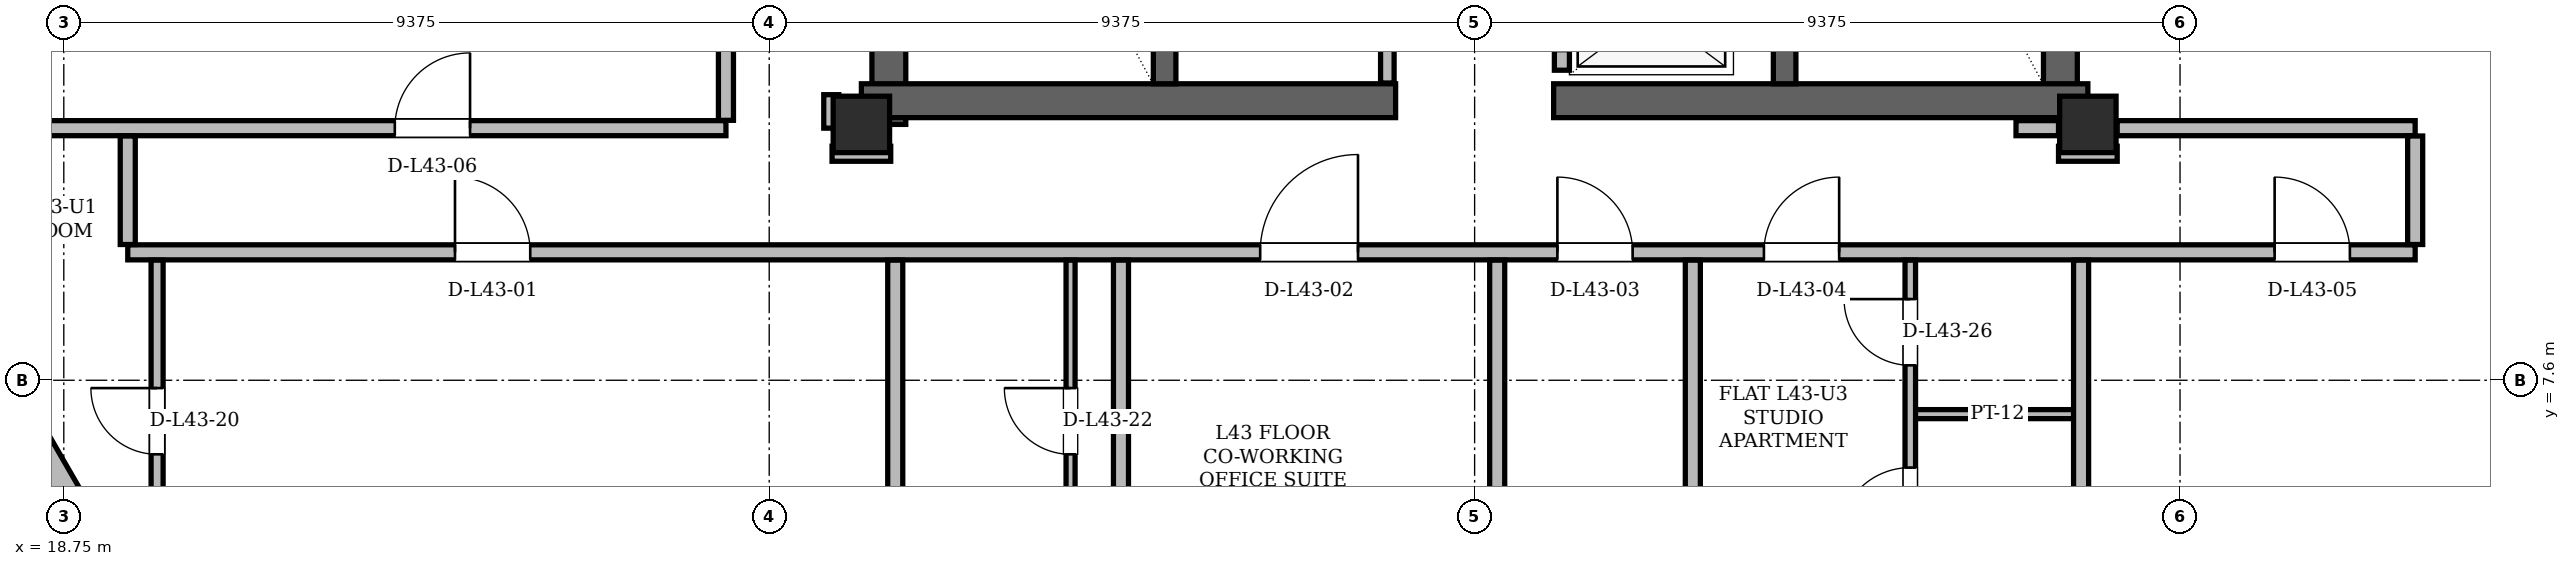
"""IFC4 building model, lengths in metres.
Left out: names, types, materials, properties, quantities, classifications, styles, units other than length and angle.
Written with IfcOpenShell. Run it as: python <this file> out.ifc"""

import sys

from ifc_helpers import new_model, si_unit, direction, frame, frame_2d, origin, origin_2d, place, context, subcontext, project, spatial, rectangle, hollow_rectangle, extrude, element, fill, save


model = new_model("IFC4")
c1 = context("Model", 3, precision=1e-05, world=origin(), true_north=direction((0.0, 1.0)))
c2 = subcontext(c1, "Body", "Model", "MODEL_VIEW")
j1 = project(units=[si_unit("LENGTHUNIT", "METRE"), si_unit("PLANEANGLEUNIT", "RADIAN")], contexts=[c1])
p1 = place(None, origin())
s1 = spatial("IfcSite", under=j1, at=p1, CompositionType="ELEMENT")
p2 = place(p1, origin())
s2 = spatial("IfcBuilding", under=s1, at=p2, CompositionType="ELEMENT")
p3 = place(p2, frame((0.0, 0.0, 163.8)))
s3 = spatial("IfcBuildingStorey", under=s2, at=p3, CompositionType="ELEMENT", Elevation=163.8)
for number, where, z_axis, x_axis in (
    (1, (29.35, 11.0, 0.0), (0.0, 0.0, 1.0), (1.0, 0.0, 0.0)),
    (2, (45.65, 11.0, 0.0), (0.0, 0.0, 1.0), (1.0, 0.0, 0.0)),
):
    element("IfcColumn", number, at=place(p3, frame(where, z_axis=z_axis, x_axis=x_axis)), inside=s3, PredefinedType="COLUMN", context=c2, shape_type="SweptSolid", body=[
        extrude(hollow_rectangle(XDim=0.75, YDim=0.75, WallThickness=0.06, at=origin_2d()), origin(), (0.0, 0.0, 1.0), 3.6),
    ])
for number, where, z_axis, x_axis in (
    (3, (29.715, 11.0, 0.0), (0.0, 0.0, 1.0), (0.0, 1.0, 0.0)),
    (4, (45.285, 11.0, 0.0), (0.0, 0.0, 1.0), (0.0, 1.0, 0.0)),
):
    element("IfcWall", number, at=place(p3, frame(where, z_axis=z_axis, x_axis=x_axis)), inside=s3, PredefinedType="SHEAR", context=c2, shape_type="SweptSolid", body=[
        extrude(rectangle(XDim=13.3, YDim=0.45, at=frame_2d((6.65, 0.0))), origin(), (0.0, 0.0, 1.0), 3.38),
    ])
for number, where, z_axis, x_axis in (
    (5, (29.35, 11.315, 0.0), (0.0, 0.0, 1.0), (1.0, 0.0, 0.0)),
    (6, (38.55, 11.315, 0.0), (0.0, 0.0, 1.0), (1.0, 0.0, 0.0)),
):
    element("IfcWall", number, at=place(p3, frame(where, z_axis=z_axis, x_axis=x_axis)), inside=s3, PredefinedType="SHEAR", context=c2, shape_type="SweptSolid", body=[
        extrude(rectangle(XDim=7.1, YDim=0.45, at=frame_2d((3.55, 0.0))), origin(), (0.0, 0.0, 1.0), 3.38),
    ])
for number, where, z_axis, x_axis in (
    (7, (33.38, 11.54, 0.0), (0.0, 0.0, 1.0), (0.0, 1.0, 0.0)),
    (8, (41.62, 11.54, 0.0), (0.0, 0.0, 1.0), (0.0, 1.0, 0.0)),
):
    element("IfcWall", number, at=place(p3, frame(where, z_axis=z_axis, x_axis=x_axis)), inside=s3, PredefinedType="SHEAR", context=c2, shape_type="SweptSolid", body=[
        extrude(rectangle(XDim=7.62, YDim=0.3, at=frame_2d((3.81, 0.0))), origin(), (0.0, 0.0, 1.0), 3.38),
    ])
p4 = place(p3, frame((15.196, 12.344, 0.0), z_axis=(0.0, 0.0, 1.0), x_axis=(0.500013908369, -0.866017373635, 0.0)))
e9 = element("IfcWall", 9, at=p4, inside=s3, PredefinedType="SOLIDWALL", context=c2, shape_type="SweptSolid", body=[
    extrude(rectangle(XDim=8.87, YDim=0.34, at=frame_2d((4.435, 0.0))), origin(), (0.0, 0.0, 1.0), 2.6),
])
p5 = place(p3, frame((36.34, 11.55, 0.0), z_axis=(0.0, 0.0, 1.0), x_axis=(0.0, 1.0, 0.0)))
e10 = element("IfcWall", 10, at=p5, inside=s3, PredefinedType="PARTITIONING", context=c2, shape_type="SweptSolid", body=[
    extrude(rectangle(XDim=5.55, YDim=0.18, at=frame_2d((2.775, 0.0))), origin(), (0.0, 0.0, 1.0), 3.38),
])
p6 = place(p5, frame((2.85, 0.0, 0.0)))
e11 = element("IfcOpeningElement", 11, at=p6, cuts=e10, PredefinedType="OPENING", context=c2, shape_type="SweptSolid", body=[
    extrude(rectangle(XDim=0.95, YDim=2.1, at=frame_2d((0.475, 1.05))), frame((0.0, 0.09, 0.0), z_axis=(0.0, -1.0, 0.0), x_axis=(1.0, 0.0, 0.0)), (0.0, 0.0, 1.0), 0.18),
])
p7 = place(p3, frame((38.66, 11.72, 0.0), z_axis=(0.0, 0.0, 1.0), x_axis=(0.0, 1.0, 0.0)))
e12 = element("IfcWall", 12, at=p7, inside=s3, PredefinedType="PARTITIONING", context=c2, shape_type="SweptSolid", body=[
    extrude(rectangle(XDim=9.1, YDim=0.2, at=frame_2d((4.55, 0.0))), origin(), (0.0, 0.0, 1.0), 3.38),
])
p8 = place(p7, frame((0.255, 0.0, 0.0)))
e13 = element("IfcOpeningElement", 13, at=p8, cuts=e12, PredefinedType="OPENING", context=c2, shape_type="SweptSolid", body=[
    extrude(rectangle(XDim=1.05, YDim=2.15, at=frame_2d((0.525, 1.075))), frame((0.0, 0.1, 0.0), z_axis=(0.0, -1.0, 0.0), x_axis=(1.0, 0.0, 0.0)), (0.0, 0.0, 1.0), 0.2),
])
p9 = place(p7, frame((2.105, 0.0, 0.0)))
e14 = element("IfcOpeningElement", 14, at=p9, cuts=e12, PredefinedType="OPENING", context=c2, shape_type="SweptSolid", body=[
    extrude(rectangle(XDim=1.05, YDim=2.15, at=frame_2d((0.525, 1.075))), frame((0.0, 0.1, 0.0), z_axis=(0.0, -1.0, 0.0), x_axis=(1.0, 0.0, 0.0)), (0.0, 0.0, 1.0), 0.2),
])
p10 = place(p7, frame((3.955, 0.0, 0.0)))
e15 = element("IfcOpeningElement", 15, at=p10, cuts=e12, PredefinedType="OPENING", context=c2, shape_type="SweptSolid", body=[
    extrude(rectangle(XDim=1.05, YDim=2.15, at=frame_2d((0.525, 1.075))), frame((0.0, 0.1, 0.0), z_axis=(0.0, -1.0, 0.0), x_axis=(1.0, 0.0, 0.0)), (0.0, 0.0, 1.0), 0.2),
])
p11 = place(p3, frame((43.29, 7.15, 0.0), z_axis=(0.0, 0.0, 1.0), x_axis=(1.0, 0.0, 0.0)))
e16 = element("IfcWall", 16, at=p11, inside=s3, PredefinedType="PARTITIONING", context=c2, shape_type="SweptSolid", body=[
    extrude(rectangle(XDim=2.321, YDim=0.12, at=frame_2d((1.16, 0.0))), origin(), (0.0, 0.0, 1.0), 3.38),
])
p12 = place(p3, frame((19.6, 9.3, 0.0), z_axis=(0.0, 0.0, 1.0), x_axis=(1.0, 0.0, 0.0)))
e17 = element("IfcWall", 17, at=p12, inside=s3, PredefinedType="PARTITIONING", context=c2, shape_type="SweptSolid", body=[
    extrude(rectangle(XDim=30.4, YDim=0.2, at=frame_2d((15.2, 0.0))), origin(), (0.0, 0.0, 1.0), 2.842),
])
p13 = place(p12, frame((4.349, 0.0, 0.0)))
e18 = element("IfcOpeningElement", 18, at=p13, cuts=e17, PredefinedType="OPENING", context=c2, shape_type="SweptSolid", body=[
    extrude(rectangle(XDim=1.0, YDim=2.18, at=frame_2d((0.5, 1.09))), frame((0.0, 0.1, 0.0), z_axis=(0.0, -1.0, 0.0), x_axis=(1.0, 0.0, 0.0)), (0.0, 0.0, 1.0), 0.2),
])
p14 = place(p12, frame((15.05, 0.0, 0.0)))
e19 = element("IfcOpeningElement", 19, at=p14, cuts=e17, PredefinedType="OPENING", context=c2, shape_type="SweptSolid", body=[
    extrude(rectangle(XDim=1.3, YDim=2.2, at=frame_2d((0.65, 1.1))), frame((0.0, 0.1, 0.0), z_axis=(0.0, -1.0, 0.0), x_axis=(1.0, 0.0, 0.0)), (0.0, 0.0, 1.0), 0.2),
])
p15 = place(p12, frame((19.0, 0.0, 0.0)))
e20 = element("IfcOpeningElement", 20, at=p15, cuts=e17, PredefinedType="OPENING", context=c2, shape_type="SweptSolid", body=[
    extrude(rectangle(XDim=1.0, YDim=2.18, at=frame_2d((0.5, 1.09))), frame((0.0, 0.1, 0.0), z_axis=(0.0, -1.0, 0.0), x_axis=(1.0, 0.0, 0.0)), (0.0, 0.0, 1.0), 0.2),
])
p16 = place(p12, frame((21.745, 0.0, 0.0)))
e21 = element("IfcOpeningElement", 21, at=p16, cuts=e17, PredefinedType="OPENING", context=c2, shape_type="SweptSolid", body=[
    extrude(rectangle(XDim=1.0, YDim=2.18, at=frame_2d((0.5, 1.09))), frame((0.0, 0.1, 0.0), z_axis=(0.0, -1.0, 0.0), x_axis=(1.0, 0.0, 0.0)), (0.0, 0.0, 1.0), 0.2),
])
p17 = place(p12, frame((28.532, 0.0, 0.0)))
e22 = element("IfcOpeningElement", 22, at=p17, cuts=e17, PredefinedType="OPENING", context=c2, shape_type="SweptSolid", body=[
    extrude(rectangle(XDim=1.0, YDim=2.18, at=frame_2d((0.5, 1.09))), frame((0.0, 0.1, 0.0), z_axis=(0.0, -1.0, 0.0), x_axis=(1.0, 0.0, 0.0)), (0.0, 0.0, 1.0), 0.2),
])
for number, where, z_axis, x_axis in (
    (23, (28.96, 10.61, 0.0), (0.0, 0.0, 1.0), (1.0, 0.0, 0.0)),
    (24, (45.26, 10.61, 0.0), (0.0, 0.0, 1.0), (1.0, 0.0, 0.0)),
):
    element("IfcWall", number, at=place(p3, frame(where, z_axis=z_axis, x_axis=x_axis)), inside=s3, PredefinedType="PARTITIONING", context=c2, shape_type="SweptSolid", body=[
        extrude(rectangle(XDim=0.78, YDim=0.2, at=frame_2d((0.39, 0.0))), origin(), (0.0, 0.0, 1.0), 2.42),
    ])
p18 = place(p3, frame((16.201, 10.95, 0.0), z_axis=(0.0, 0.0, 1.0), x_axis=(1.0, 0.0, 0.0)))
e25 = element("IfcWall", 25, at=p18, inside=s3, PredefinedType="PARTITIONING", context=c2, shape_type="SweptSolid", body=[
    extrude(rectangle(XDim=11.349, YDim=0.2, at=frame_2d((5.674, 0.0))), origin(), (0.0, 0.0, 1.0), 3.38),
])
p19 = place(p18, frame((6.948, 0.0, 0.0)))
e26 = element("IfcOpeningElement", 26, at=p19, cuts=e25, PredefinedType="OPENING", context=c2, shape_type="SweptSolid", body=[
    extrude(rectangle(XDim=1.0, YDim=2.18, at=frame_2d((0.5, 1.09))), frame((0.0, 0.1, 0.0), z_axis=(0.0, -1.0, 0.0), x_axis=(1.0, 0.0, 0.0)), (0.0, 0.0, 1.0), 0.2),
])
p20 = place(p3, frame((44.695, 10.95, 0.0), z_axis=(0.0, 0.0, 1.0), x_axis=(1.0, 0.0, 0.0)))
e27 = element("IfcWall", 27, at=p20, inside=s3, PredefinedType="PARTITIONING", context=c2, shape_type="SweptSolid", body=[
    extrude(rectangle(XDim=0.565, YDim=0.2, at=frame_2d((0.282, 0.0))), origin(), (0.0, 0.0, 1.0), 2.42),
])
p21 = place(p3, frame((46.04, 10.95, 0.0), z_axis=(0.0, 0.0, 1.0), x_axis=(1.0, 0.0, 0.0)))
e28 = element("IfcWall", 28, at=p21, inside=s3, PredefinedType="PARTITIONING", context=c2, shape_type="SweptSolid", body=[
    extrude(rectangle(XDim=3.96, YDim=0.2, at=frame_2d((1.98, 0.0))), origin(), (0.0, 0.0, 1.0), 2.842),
])
p22 = place(p3, frame((19.6, 9.404, 0.0), z_axis=(0.0, 0.0, 1.0), x_axis=(0.0, 1.0, 0.0)))
e29 = element("IfcWall", 29, at=p22, inside=s3, PredefinedType="PARTITIONING", context=c2, shape_type="SweptSolid", body=[
    extrude(rectangle(XDim=1.442, YDim=0.2, at=frame_2d((0.721, 0.0))), origin(), (0.0, 0.0, 1.0), 3.38),
])
p23 = place(p3, frame((19.99, 4.836, 0.0), z_axis=(0.0, 0.0, 1.0), x_axis=(0.0, 1.0, 0.0)))
e30 = element("IfcWall", 30, at=p23, inside=s3, PredefinedType="PARTITIONING", context=c2, shape_type="SweptSolid", body=[
    extrude(rectangle(XDim=4.36, YDim=0.16, at=frame_2d((2.18, 0.0))), origin(), (0.0, 0.0, 1.0), 2.842),
])
p24 = place(p23, frame((1.78, 0.0, 0.0)))
e31 = element("IfcOpeningElement", 31, at=p24, cuts=e30, PredefinedType="OPENING", context=c2, shape_type="SweptSolid", body=[
    extrude(rectangle(XDim=0.88, YDim=2.08, at=frame_2d((0.44, 1.04))), frame((0.0, 0.08, 0.0), z_axis=(0.0, -1.0, 0.0), x_axis=(1.0, 0.0, 0.0)), (0.0, 0.0, 1.0), 0.16),
])
p25 = place(p3, frame((27.55, 11.054, 0.0), z_axis=(0.0, 0.0, 1.0), x_axis=(0.0, 1.0, 0.0)))
e32 = element("IfcWall", 32, at=p25, inside=s3, PredefinedType="PARTITIONING", context=c2, shape_type="SweptSolid", body=[
    extrude(rectangle(XDim=5.692, YDim=0.2, at=frame_2d((2.846, 0.0))), origin(), (0.0, 0.0, 1.0), 2.842),
])
p26 = place(p3, frame((28.95, 10.95, 0.0), z_axis=(0.0, 0.0, 1.0), x_axis=(0.0, 1.0, 0.0)))
e33 = element("IfcWall", 33, at=p26, inside=s3, PredefinedType="PARTITIONING", context=c2, shape_type="SweptSolid", body=[
    extrude(rectangle(XDim=0.445, YDim=0.2, at=frame_2d((0.223, 0.0))), origin(), (0.0, 0.0, 1.0), 2.842),
])
p27 = place(p3, frame((29.8, 4.836, 0.0), z_axis=(0.0, 0.0, 1.0), x_axis=(0.0, 1.0, 0.0)))
e34 = element("IfcWall", 34, at=p27, inside=s3, PredefinedType="PARTITIONING", context=c2, shape_type="SweptSolid", body=[
    extrude(rectangle(XDim=4.36, YDim=0.2, at=frame_2d((2.18, 0.0))), origin(), (0.0, 0.0, 1.0), 3.38),
])
p28 = place(p3, frame((32.13, 4.836, 0.0), z_axis=(0.0, 0.0, 1.0), x_axis=(0.0, 1.0, 0.0)))
e35 = element("IfcWall", 35, at=p28, inside=s3, PredefinedType="PARTITIONING", context=c2, shape_type="SweptSolid", body=[
    extrude(rectangle(XDim=4.36, YDim=0.12, at=frame_2d((2.18, 0.0))), origin(), (0.0, 0.0, 1.0), 2.966),
])
p29 = place(p28, frame((1.78, 0.0, 0.0)))
e36 = element("IfcOpeningElement", 36, at=p29, cuts=e35, PredefinedType="OPENING", context=c2, shape_type="SweptSolid", body=[
    extrude(rectangle(XDim=0.88, YDim=2.08, at=frame_2d((0.44, 1.04))), frame((0.0, 0.06, 0.0), z_axis=(0.0, -1.0, 0.0), x_axis=(1.0, 0.0, 0.0)), (0.0, 0.0, 1.0), 0.12),
])
p30 = place(p3, frame((32.8, 5.104, 0.0), z_axis=(0.0, 0.0, 1.0), x_axis=(0.0, 1.0, 0.0)))
e37 = element("IfcWall", 37, at=p30, inside=s3, PredefinedType="PARTITIONING", context=c2, shape_type="SweptSolid", body=[
    extrude(rectangle(XDim=4.092, YDim=0.2, at=frame_2d((2.046, 0.0))), origin(), (0.0, 0.0, 1.0), 2.966),
])
p31 = place(p3, frame((37.8, 5.104, 0.0), z_axis=(0.0, 0.0, 1.0), x_axis=(0.0, 1.0, 0.0)))
e38 = element("IfcWall", 38, at=p31, inside=s3, PredefinedType="PARTITIONING", context=c2, shape_type="SweptSolid", body=[
    extrude(rectangle(XDim=4.092, YDim=0.2, at=frame_2d((2.046, 0.0))), origin(), (0.0, 0.0, 1.0), 3.38),
])
p32 = place(p3, frame((40.4, 4.836, 0.0), z_axis=(0.0, 0.0, 1.0), x_axis=(0.0, 1.0, 0.0)))
e39 = element("IfcWall", 39, at=p32, inside=s3, PredefinedType="PARTITIONING", context=c2, shape_type="SweptSolid", body=[
    extrude(rectangle(XDim=4.36, YDim=0.2, at=frame_2d((2.18, 0.0))), origin(), (0.0, 0.0, 1.0), 3.38),
])
p33 = place(p3, frame((43.29, 4.836, 0.0), z_axis=(0.0, 0.0, 1.0), x_axis=(0.0, 1.0, 0.0)))
e40 = element("IfcWall", 40, at=p33, inside=s3, PredefinedType="PARTITIONING", context=c2, shape_type="SweptSolid", body=[
    extrude(rectangle(XDim=4.36, YDim=0.14, at=frame_2d((2.18, 0.0))), origin(), (0.0, 0.0, 1.0), 2.966),
])
p34 = place(p33, frame((0.654, 0.0, 0.0)))
e41 = element("IfcOpeningElement", 41, at=p34, cuts=e40, PredefinedType="OPENING", context=c2, shape_type="SweptSolid", body=[
    extrude(rectangle(XDim=0.95, YDim=2.1, at=frame_2d((0.475, 1.05))), frame((0.0, 0.07, 0.0), z_axis=(0.0, -1.0, 0.0), x_axis=(1.0, 0.0, 0.0)), (0.0, 0.0, 1.0), 0.14),
])
p35 = place(p33, frame((2.962, 0.0, 0.0)))
e42 = element("IfcOpeningElement", 42, at=p35, cuts=e40, PredefinedType="OPENING", context=c2, shape_type="SweptSolid", body=[
    extrude(rectangle(XDim=0.88, YDim=2.08, at=frame_2d((0.44, 1.04))), frame((0.0, 0.07, 0.0), z_axis=(0.0, -1.0, 0.0), x_axis=(1.0, 0.0, 0.0)), (0.0, 0.0, 1.0), 0.14),
])
p36 = place(p3, frame((45.56, 4.836, 0.0), z_axis=(0.0, 0.0, 1.0), x_axis=(0.0, 1.0, 0.0)))
e43 = element("IfcWall", 43, at=p36, inside=s3, PredefinedType="PARTITIONING", context=c2, shape_type="SweptSolid", body=[
    extrude(rectangle(XDim=4.36, YDim=0.2, at=frame_2d((2.18, 0.0))), origin(), (0.0, 0.0, 1.0), 2.966),
])
p37 = place(p3, frame((50.0, 9.404, 0.0), z_axis=(0.0, 0.0, 1.0), x_axis=(0.0, 1.0, 0.0)))
e44 = element("IfcWall", 44, at=p37, inside=s3, PredefinedType="PARTITIONING", context=c2, shape_type="SweptSolid", body=[
    extrude(rectangle(XDim=1.442, YDim=0.2, at=frame_2d((0.721, 0.0))), origin(), (0.0, 0.0, 1.0), 3.38),
])
p38 = place(p13, origin())
e45 = element("IfcDoor", 45, at=p38, inside=s3, OperationType="SINGLE_SWING_LEFT", PredefinedType="DOOR", context=c2, shape_type="SweptSolid", body=[
    extrude(rectangle(XDim=1.0, YDim=2.18, at=frame_2d((0.5, 1.09))), frame((0.0, 0.025, 0.0), z_axis=(0.0, -1.0, 0.0), x_axis=(1.0, 0.0, 0.0)), (0.0, 0.0, 1.0), 0.05),
])
fill(e18, e45)
p39 = place(p14, origin())
e46 = element("IfcDoor", 46, at=p39, inside=s3, OperationType="SINGLE_SWING_RIGHT", PredefinedType="DOOR", context=c2, shape_type="SweptSolid", body=[
    extrude(rectangle(XDim=1.3, YDim=2.2, at=frame_2d((0.65, 1.1))), frame((0.0, 0.025, 0.0), z_axis=(0.0, -1.0, 0.0), x_axis=(1.0, 0.0, 0.0)), (0.0, 0.0, 1.0), 0.05),
])
fill(e19, e46)
p40 = place(p15, origin())
e47 = element("IfcDoor", 47, at=p40, inside=s3, OperationType="SINGLE_SWING_LEFT", PredefinedType="DOOR", context=c2, shape_type="SweptSolid", body=[
    extrude(rectangle(XDim=1.0, YDim=2.18, at=frame_2d((0.5, 1.09))), frame((0.0, 0.025, 0.0), z_axis=(0.0, -1.0, 0.0), x_axis=(1.0, 0.0, 0.0)), (0.0, 0.0, 1.0), 0.05),
])
fill(e20, e47)
p41 = place(p16, origin())
e48 = element("IfcDoor", 48, at=p41, inside=s3, OperationType="SINGLE_SWING_RIGHT", PredefinedType="DOOR", context=c2, shape_type="SweptSolid", body=[
    extrude(rectangle(XDim=1.0, YDim=2.18, at=frame_2d((0.5, 1.09))), frame((0.0, 0.025, 0.0), z_axis=(0.0, -1.0, 0.0), x_axis=(1.0, 0.0, 0.0)), (0.0, 0.0, 1.0), 0.05),
])
fill(e21, e48)
p42 = place(p17, origin())
e49 = element("IfcDoor", 49, at=p42, inside=s3, OperationType="SINGLE_SWING_LEFT", PredefinedType="DOOR", context=c2, shape_type="SweptSolid", body=[
    extrude(rectangle(XDim=1.0, YDim=2.18, at=frame_2d((0.5, 1.09))), frame((0.0, 0.025, 0.0), z_axis=(0.0, -1.0, 0.0), x_axis=(1.0, 0.0, 0.0)), (0.0, 0.0, 1.0), 0.05),
])
fill(e22, e49)
p43 = place(p19, origin())
e50 = element("IfcDoor", 50, at=p43, inside=s3, OperationType="SINGLE_SWING_RIGHT", PredefinedType="DOOR", context=c2, shape_type="SweptSolid", body=[
    extrude(rectangle(XDim=1.0, YDim=2.18, at=frame_2d((0.5, 1.09))), frame((0.0, 0.025, 0.0), z_axis=(0.0, -1.0, 0.0), x_axis=(1.0, 0.0, 0.0)), (0.0, 0.0, 1.0), 0.05),
])
fill(e26, e50)
p44 = place(p24, origin())
e51 = element("IfcDoor", 51, at=p44, inside=s3, OperationType="SINGLE_SWING_RIGHT", PredefinedType="DOOR", context=c2, shape_type="SweptSolid", body=[
    extrude(rectangle(XDim=0.88, YDim=2.08, at=frame_2d((0.44, 1.04))), frame((0.0, 0.025, 0.0), z_axis=(0.0, -1.0, 0.0), x_axis=(1.0, 0.0, 0.0)), (0.0, 0.0, 1.0), 0.05),
])
fill(e31, e51)
p45 = place(p29, origin())
e52 = element("IfcDoor", 52, at=p45, inside=s3, OperationType="SINGLE_SWING_RIGHT", PredefinedType="DOOR", context=c2, shape_type="SweptSolid", body=[
    extrude(rectangle(XDim=0.88, YDim=2.08, at=frame_2d((0.44, 1.04))), frame((0.0, 0.025, 0.0), z_axis=(0.0, -1.0, 0.0), x_axis=(1.0, 0.0, 0.0)), (0.0, 0.0, 1.0), 0.05),
])
fill(e36, e52)
p46 = place(p34, origin())
e53 = element("IfcDoor", 53, at=p46, inside=s3, OperationType="SINGLE_SWING_LEFT", PredefinedType="DOOR", context=c2, shape_type="SweptSolid", body=[
    extrude(rectangle(XDim=0.95, YDim=2.1, at=frame_2d((0.475, 1.05))), frame((0.0, 0.025, 0.0), z_axis=(0.0, -1.0, 0.0), x_axis=(1.0, 0.0, 0.0)), (0.0, 0.0, 1.0), 0.05),
])
fill(e41, e53)
p47 = place(p35, origin())
e54 = element("IfcDoor", 54, at=p47, inside=s3, OperationType="SINGLE_SWING_RIGHT", PredefinedType="DOOR", context=c2, shape_type="SweptSolid", body=[
    extrude(rectangle(XDim=0.88, YDim=2.08, at=frame_2d((0.44, 1.04))), frame((0.0, 0.025, 0.0), z_axis=(0.0, -1.0, 0.0), x_axis=(1.0, 0.0, 0.0)), (0.0, 0.0, 1.0), 0.05),
])
fill(e42, e54)
save(model, sys.argv[1])
